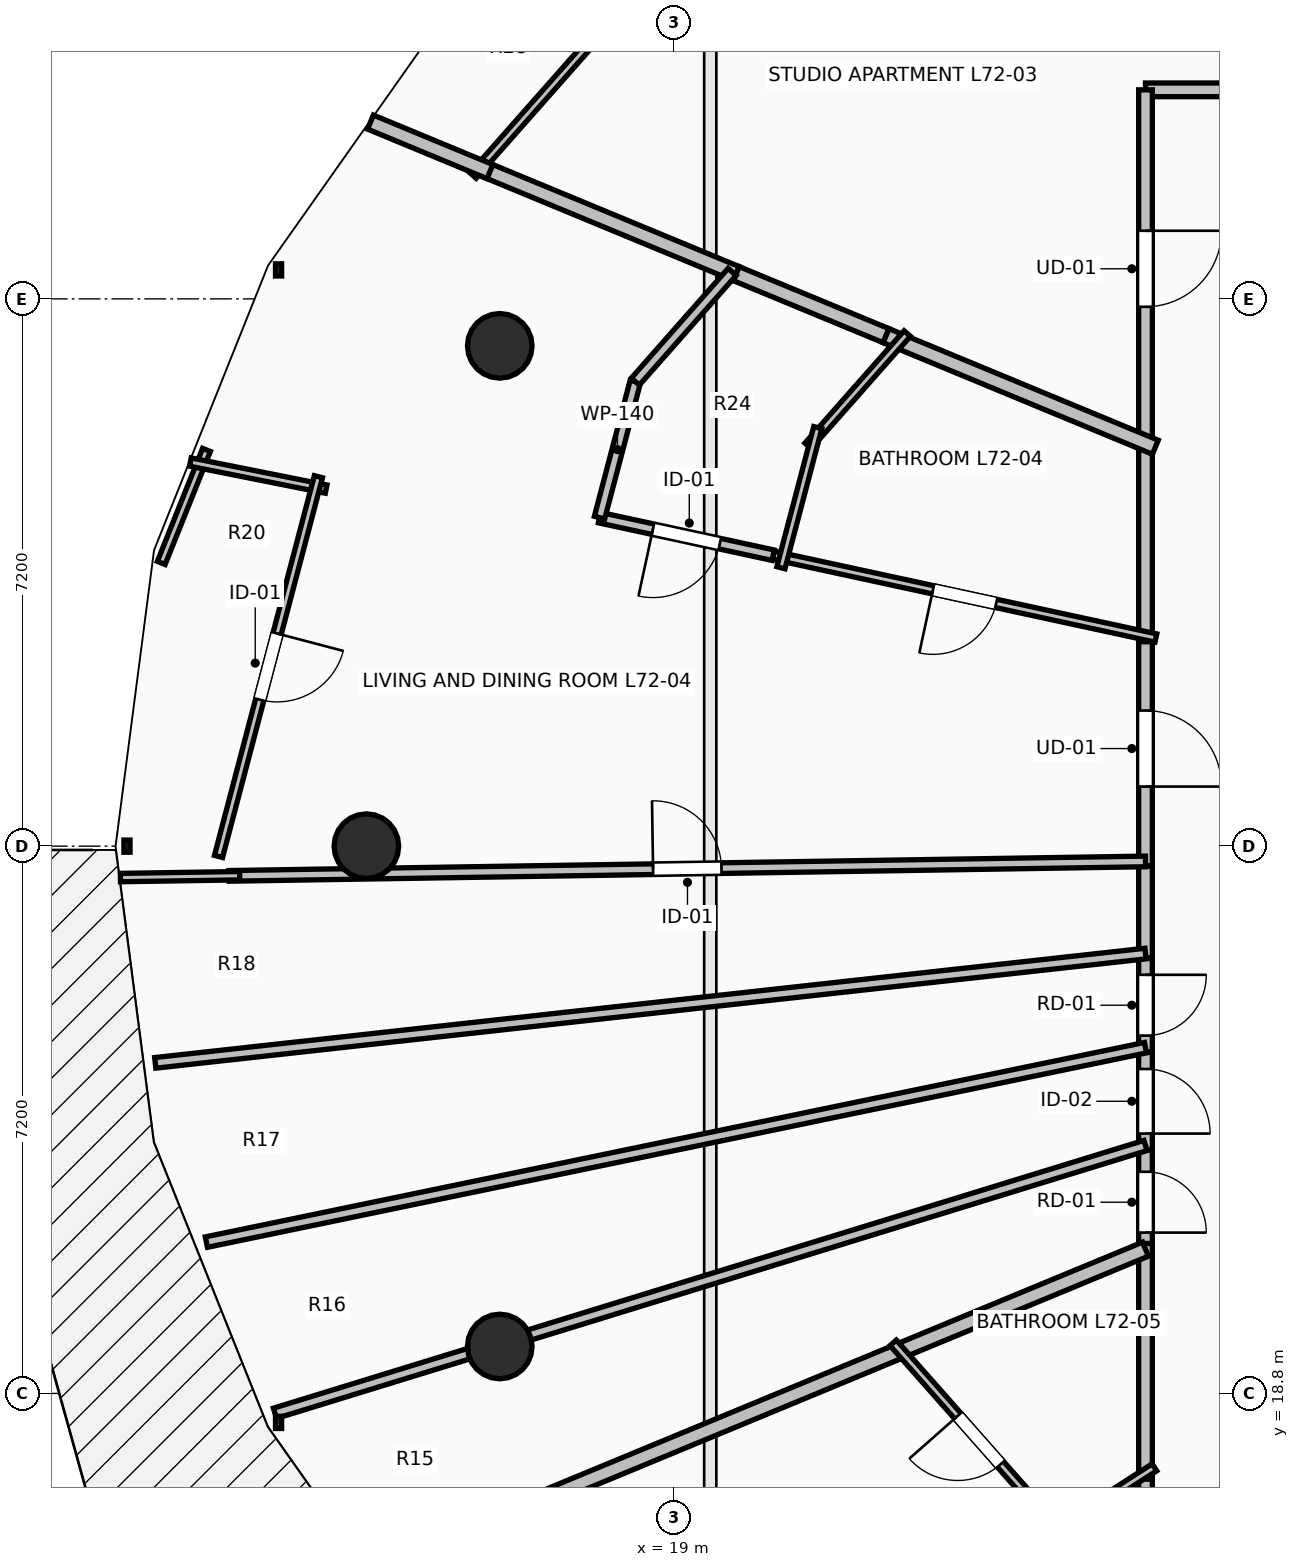
"""IFC4 building model, lengths in metres.
Left out: names, types, materials, properties, quantities, classifications, styles, units other than length and angle.
Written with IfcOpenShell. Run it as: python <this file> out.ifc"""

import sys

from ifc_helpers import new_model, si_unit, direction, frame, frame_2d, origin, origin_2d, place, context, subcontext, project, spatial, rectangle, circle, extrude, element, fill, save


model = new_model("IFC4")
c1 = context("Model", 3, precision=1e-05, world=origin(), true_north=direction((0.0, 1.0)))
c2 = subcontext(c1, "Body", "Model", "MODEL_VIEW")
j1 = project(units=[si_unit("LENGTHUNIT", "METRE"), si_unit("PLANEANGLEUNIT", "RADIAN")], contexts=[c1])
p1 = place(None, origin())
s1 = spatial("IfcSite", under=j1, at=p1, CompositionType="ELEMENT")
p2 = place(p1, origin())
s2 = spatial("IfcBuilding", under=s1, at=p2, CompositionType="ELEMENT")
p3 = place(p2, frame((0.0, 0.0, 266.2)))
s3 = spatial("IfcBuildingStorey", under=s2, at=p3, CompositionType="ELEMENT", Elevation=266.2)
for number, where, z_axis, x_axis in (
    (1, (16.705, 32.582, 0.0), (0.0, 0.0, 1.0), (-0.924, 0.383, 0.0)),
    (2, (14.95, 26.0, 0.0), (0.0, 0.0, 1.0), (-1.0, 0.0, 0.0)),
    (3, (16.705, 19.418, 0.0), (0.0, 0.0, 1.0), (-0.924, -0.383, 0.0)),
):
    element("IfcColumn", number, at=place(p3, frame(where, z_axis=z_axis, x_axis=x_axis)), inside=s3, PredefinedType="COLUMN", context=c2, shape_type="SweptSolid", body=[
        extrude(circle(Radius=0.425, at=origin_2d()), origin(), (0.0, 0.0, 1.0), 3.55),
    ])
p4 = place(p3, frame((29.006, 35.95, 0.0), z_axis=(0.0, 0.0, 1.0), x_axis=(-1.0, 0.0, 0.0)))
e4 = element("IfcWall", 4, at=p4, inside=s3, PredefinedType="PARTITIONING", context=c2, shape_type="SweptSolid", body=[
    extrude(rectangle(XDim=3.806, YDim=0.18, at=frame_2d((1.903, 0.0))), origin(), (0.0, 0.0, 1.0), 2.482),
])
p5 = place(p3, frame((25.2, 35.95, 0.0), z_axis=(0.0, 0.0, 1.0), x_axis=(0.0, -1.0, 0.0)))
e5 = element("IfcWall", 5, at=p5, inside=s3, PredefinedType="PARTITIONING", context=c2, shape_type="SweptSolid", body=[
    extrude(rectangle(XDim=4.708, YDim=0.18, at=frame_2d((2.354, 0.0))), origin(), (0.0, 0.0, 1.0), 2.482),
])
p6 = place(p5, frame((1.854, 0.0, 0.0)))
e6 = element("IfcOpeningElement", 6, at=p6, cuts=e5, PredefinedType="OPENING", context=c2, shape_type="SweptSolid", body=[
    extrude(rectangle(XDim=1.0, YDim=2.15, at=frame_2d((0.5, 1.075))), frame((0.0, 0.105, 0.0), z_axis=(0.0, -1.0, 0.0), x_axis=(1.0, 0.0, 0.0)), (0.0, 0.0, 1.0), 0.21),
])
p7 = place(p3, frame((25.2, 28.829, 0.0), z_axis=(0.0, 0.0, 1.0), x_axis=(0.0, -1.0, 0.0)))
e7 = element("IfcWall", 7, at=p7, inside=s3, PredefinedType="PARTITIONING", context=c2, shape_type="SweptSolid", body=[
    extrude(rectangle(XDim=3.09, YDim=0.18, at=frame_2d((1.545, 0.0))), origin(), (0.0, 0.0, 1.0), 2.482),
])
p8 = place(p7, frame((1.045, 0.0, 0.0)))
e8 = element("IfcOpeningElement", 8, at=p8, cuts=e7, PredefinedType="OPENING", context=c2, shape_type="SweptSolid", body=[
    extrude(rectangle(XDim=1.0, YDim=2.15, at=frame_2d((0.5, 1.075))), frame((0.0, 0.105, 0.0), z_axis=(0.0, -1.0, 0.0), x_axis=(1.0, 0.0, 0.0)), (0.0, 0.0, 1.0), 0.21),
])
p9 = place(p3, frame((25.2, 31.382, 0.0), z_axis=(0.0, 0.0, 1.0), x_axis=(0.0, -1.0, 0.0)))
e9 = element("IfcWall", 9, at=p9, inside=s3, PredefinedType="PARTITIONING", context=c2, shape_type="SweptSolid", body=[
    extrude(rectangle(XDim=2.693, YDim=0.18, at=frame_2d((1.347, 0.0))), origin(), (0.0, 0.0, 1.0), 2.482),
])
p10 = place(p3, frame((25.2, 25.739, 0.0), z_axis=(0.0, 0.0, 1.0), x_axis=(0.0, -1.0, 0.0)))
e10 = element("IfcWall", 10, at=p10, inside=s3, PredefinedType="PARTITIONING", context=c2, shape_type="SweptSolid", body=[
    extrude(rectangle(XDim=1.212, YDim=0.18, at=frame_2d((0.606, 0.0))), origin(), (0.0, 0.0, 1.0), 3.29),
])
p11 = place(p3, frame((25.2, 24.527, 0.0), z_axis=(0.0, 0.0, 1.0), x_axis=(0.0, -1.0, 0.0)))
e11 = element("IfcWall", 11, at=p11, inside=s3, PredefinedType="PARTITIONING", context=c2, shape_type="SweptSolid", body=[
    extrude(rectangle(XDim=1.239, YDim=0.18, at=frame_2d((0.62, 0.0))), origin(), (0.0, 0.0, 1.0), 3.29),
])
p12 = place(p11, frame((0.219, 0.0, 0.0)))
e12 = element("IfcOpeningElement", 12, at=p12, cuts=e11, PredefinedType="OPENING", context=c2, shape_type="SweptSolid", body=[
    extrude(rectangle(XDim=0.8, YDim=2.05, at=frame_2d((0.4, 1.025))), frame((0.0, 0.105, 0.0), z_axis=(0.0, -1.0, 0.0), x_axis=(1.0, 0.0, 0.0)), (0.0, 0.0, 1.0), 0.21),
])
p13 = place(p3, frame((25.2, 23.288, 0.0), z_axis=(0.0, 0.0, 1.0), x_axis=(0.0, -1.0, 0.0)))
e13 = element("IfcWall", 13, at=p13, inside=s3, PredefinedType="PARTITIONING", context=c2, shape_type="SweptSolid", body=[
    extrude(rectangle(XDim=1.289, YDim=0.18, at=frame_2d((0.645, 0.0))), origin(), (0.0, 0.0, 1.0), 3.29),
])
p14 = place(p13, frame((0.219, 0.0, 0.0)))
e14 = element("IfcOpeningElement", 14, at=p14, cuts=e13, PredefinedType="OPENING", context=c2, shape_type="SweptSolid", body=[
    extrude(rectangle(XDim=0.85, YDim=2.1, at=frame_2d((0.425, 1.05))), frame((0.0, 0.105, 0.0), z_axis=(0.0, -1.0, 0.0), x_axis=(1.0, 0.0, 0.0)), (0.0, 0.0, 1.0), 0.21),
])
p15 = place(p3, frame((25.2, 21.999, 0.0), z_axis=(0.0, 0.0, 1.0), x_axis=(0.0, -1.0, 0.0)))
e15 = element("IfcWall", 15, at=p15, inside=s3, PredefinedType="PARTITIONING", context=c2, shape_type="SweptSolid", body=[
    extrude(rectangle(XDim=1.366, YDim=0.18, at=frame_2d((0.683, 0.0))), origin(), (0.0, 0.0, 1.0), 3.29),
])
p16 = place(p15, frame((0.283, 0.0, 0.0)))
e16 = element("IfcOpeningElement", 16, at=p16, cuts=e15, PredefinedType="OPENING", context=c2, shape_type="SweptSolid", body=[
    extrude(rectangle(XDim=0.8, YDim=2.05, at=frame_2d((0.4, 1.025))), frame((0.0, 0.105, 0.0), z_axis=(0.0, -1.0, 0.0), x_axis=(1.0, 0.0, 0.0)), (0.0, 0.0, 1.0), 0.21),
])
p17 = place(p3, frame((25.2, 17.812, 0.0), z_axis=(0.0, 0.0, 1.0), x_axis=(0.0, -1.0, 0.0)))
e17 = element("IfcWall", 17, at=p17, inside=s3, PredefinedType="PARTITIONING", context=c2, shape_type="SweptSolid", body=[
    extrude(rectangle(XDim=3.762, YDim=0.18, at=frame_2d((1.881, 0.0))), origin(), (0.0, 0.0, 1.0), 2.482),
])
p18 = place(p17, frame((1.381, 0.0, 0.0)))
e18 = element("IfcOpeningElement", 18, at=p18, cuts=e17, PredefinedType="OPENING", context=c2, shape_type="SweptSolid", body=[
    extrude(rectangle(XDim=1.0, YDim=2.15, at=frame_2d((0.5, 1.075))), frame((0.0, 0.105, 0.0), z_axis=(0.0, -1.0, 0.0), x_axis=(1.0, 0.0, 0.0)), (0.0, 0.0, 1.0), 0.21),
])
p19 = place(p3, frame((25.2, 20.773, 0.0), z_axis=(0.0, 0.0, 1.0), x_axis=(0.0, -1.0, 0.0)))
e19 = element("IfcWall", 19, at=p19, inside=s3, PredefinedType="PARTITIONING", context=c2, shape_type="SweptSolid", body=[
    extrude(rectangle(XDim=3.101, YDim=0.18, at=frame_2d((1.55, 0.0))), origin(), (0.0, 0.0, 1.0), 3.29),
])
p20 = place(p3, frame((20.444, 39.452, 0.0), z_axis=(0.0, 0.0, 1.0), x_axis=(-0.662167862663, -0.749355537549, 0.0)))
e20 = element("IfcWall", 20, at=p20, inside=s3, PredefinedType="PARTITIONING", context=c2, shape_type="SweptSolid", body=[
    extrude(rectangle(XDim=6.177, YDim=0.11, at=frame_2d((3.089, 0.0))), origin(), (0.0, 0.0, 1.0), 3.29),
])
p21 = place(p20, frame((2.639, 0.0, 0.0)))
e21 = element("IfcOpeningElement", 21, at=p21, cuts=e20, PredefinedType="OPENING", context=c2, shape_type="SweptSolid", body=[
    extrude(rectangle(XDim=0.9, YDim=2.1, at=frame_2d((0.45, 1.05))), frame((0.0, 0.07, 0.0), z_axis=(0.0, -1.0, 0.0), x_axis=(1.0, 0.0, 0.0)), (0.0, 0.0, 1.0), 0.14),
])
p22 = place(p3, frame((16.446, 34.928, 0.0), z_axis=(0.0, 0.0, 1.0), x_axis=(0.923904292622, -0.3826236507, 0.0)))
e22 = element("IfcWall", 22, at=p22, inside=s3, PredefinedType="PARTITIONING", context=c2, shape_type="SweptSolid", body=[
    extrude(rectangle(XDim=3.648, YDim=0.2, at=frame_2d((1.824, 0.0))), origin(), (0.0, 0.0, 1.0), 2.874),
])
p23 = place(p3, frame((21.785, 32.717, 0.0), z_axis=(0.0, 0.0, 1.0), x_axis=(0.923878783617, -0.382685240352, 0.0)))
e23 = element("IfcWall", 23, at=p23, inside=s3, PredefinedType="PARTITIONING", context=c2, shape_type="SweptSolid", body=[
    extrude(rectangle(XDim=3.837, YDim=0.2, at=frame_2d((1.918, 0.0))), origin(), (0.0, 0.0, 1.0), 2.979),
])
p24 = place(p3, frame((19.817, 33.532, 0.0), z_axis=(0.0, 0.0, 1.0), x_axis=(0.92391905869, -0.382587993786, 0.0)))
e24 = element("IfcWall", 24, at=p24, inside=s3, PredefinedType="PARTITIONING", context=c2, shape_type="SweptSolid", body=[
    extrude(rectangle(XDim=2.13, YDim=0.2, at=frame_2d((1.065, 0.0))), origin(), (0.0, 0.0, 1.0), 2.936),
])
p25 = place(p3, frame((15.004, 35.526, 0.0), z_axis=(0.0, 0.0, 1.0), x_axis=(0.923843638485, -0.382770076719, 0.0)))
e25 = element("IfcWall", 25, at=p25, inside=s3, PredefinedType="PARTITIONING", context=c2, shape_type="SweptSolid", body=[
    extrude(rectangle(XDim=1.701, YDim=0.2, at=frame_2d((0.851, 0.0))), origin(), (0.0, 0.0, 1.0), 3.29),
])
p26 = place(p3, frame((25.337, 28.738, 0.0), z_axis=(0.0, 0.0, 1.0), x_axis=(-0.977382932841, 0.211477191656, 0.0)))
e26 = element("IfcWall", 26, at=p26, inside=s3, PredefinedType="PARTITIONING", context=c2, shape_type="SweptSolid", body=[
    extrude(rectangle(XDim=5.151, YDim=0.11, at=frame_2d((2.576, 0.0))), origin(), (0.0, 0.0, 1.0), 2.482),
])
p27 = place(p26, frame((2.15, 0.0, 0.0)))
e27 = element("IfcOpeningElement", 27, at=p27, cuts=e26, PredefinedType="OPENING", context=c2, shape_type="SweptSolid", body=[
    extrude(rectangle(XDim=0.85, YDim=2.1, at=frame_2d((0.425, 1.05))), frame((0.0, 0.07, 0.0), z_axis=(0.0, -1.0, 0.0), x_axis=(1.0, 0.0, 0.0)), (0.0, 0.0, 1.0), 0.14),
])
p28 = place(p3, frame((12.846, 31.213, 0.0), z_axis=(0.0, 0.0, 1.0), x_axis=(-0.371522095559, -0.928424112414, 0.0)))
e28 = element("IfcWall", 28, at=p28, inside=s3, PredefinedType="PARTITIONING", context=c2, shape_type="SweptSolid", body=[
    extrude(rectangle(XDim=1.602, YDim=0.11, at=frame_2d((0.801, 0.0))), origin(), (0.0, 0.0, 1.0), 3.29),
])
p29 = place(p3, frame((12.635, 31.053, 0.0), z_axis=(0.0, 0.0, 1.0), x_axis=(0.980704252003, -0.195497238094, 0.0)))
e29 = element("IfcWall", 29, at=p29, inside=s3, PredefinedType="PARTITIONING", context=c2, shape_type="SweptSolid", body=[
    extrude(rectangle(XDim=1.821, YDim=0.11, at=frame_2d((0.91, 0.0))), origin(), (0.0, 0.0, 1.0), 3.29),
])
p30 = place(p3, frame((14.319, 30.86, 0.0), z_axis=(0.0, 0.0, 1.0), x_axis=(-0.254404898477, -0.967097796312, 0.0)))
e30 = element("IfcWall", 30, at=p30, inside=s3, PredefinedType="PARTITIONING", context=c2, shape_type="SweptSolid", body=[
    extrude(rectangle(XDim=5.166, YDim=0.11, at=frame_2d((2.583, 0.0))), origin(), (0.0, 0.0, 1.0), 3.29),
])
p31 = place(p30, frame((2.133, 0.0, 0.0)))
e31 = element("IfcOpeningElement", 31, at=p31, cuts=e30, PredefinedType="OPENING", context=c2, shape_type="SweptSolid", body=[
    extrude(rectangle(XDim=0.9, YDim=2.1, at=frame_2d((0.45, 1.05))), frame((0.0, 0.07, 0.0), z_axis=(0.0, -1.0, 0.0), x_axis=(1.0, 0.0, 0.0)), (0.0, 0.0, 1.0), 0.14),
])
p32 = place(p3, frame((20.302, 29.828, 0.0), z_axis=(0.0, 0.0, 1.0), x_axis=(-0.977387924942, 0.211454118377, 0.0)))
e32 = element("IfcWall", 32, at=p32, inside=s3, PredefinedType="PARTITIONING", context=c2, shape_type="SweptSolid", body=[
    extrude(rectangle(XDim=2.338, YDim=0.14, at=frame_2d((1.169, 0.0))), origin(), (0.0, 0.0, 1.0), 2.936),
])
p33 = place(p32, frame((0.719, 0.0, 0.0)))
e33 = element("IfcOpeningElement", 33, at=p33, cuts=e32, PredefinedType="OPENING", context=c2, shape_type="SweptSolid", body=[
    extrude(rectangle(XDim=0.9, YDim=2.1, at=frame_2d((0.45, 1.05))), frame((0.0, 0.085, 0.0), z_axis=(0.0, -1.0, 0.0), x_axis=(1.0, 0.0, 0.0)), (0.0, 0.0, 1.0), 0.17),
])
p34 = place(p3, frame((18.017, 30.322, 0.0), z_axis=(0.0, 0.0, 1.0), x_axis=(0.254434866485, 0.967089912426, 0.0)))
e34 = element("IfcWall", 34, at=p34, inside=s3, PredefinedType="PARTITIONING", context=c2, shape_type="SweptSolid", body=[
    extrude(rectangle(XDim=1.851, YDim=0.14, at=frame_2d((0.926, 0.0))), origin(), (0.0, 0.0, 1.0), 2.482),
])
p35 = place(p3, frame((18.488, 32.112, 0.0), z_axis=(0.0, 0.0, 1.0), x_axis=(0.661856531983, 0.749630529709, 0.0)))
e35 = element("IfcWall", 35, at=p35, inside=s3, PredefinedType="PARTITIONING", context=c2, shape_type="SweptSolid", body=[
    extrude(rectangle(XDim=1.925, YDim=0.14, at=frame_2d((0.962, 0.0))), origin(), (0.0, 0.0, 1.0), 2.482),
])
p36 = place(p3, frame((13.143, 25.609, 0.0), z_axis=(0.0, 0.0, 1.0), x_axis=(0.999875613351, 0.015772058374, 0.0)))
e36 = element("IfcWall", 36, at=p36, inside=s3, PredefinedType="PARTITIONING", context=c2, shape_type="SweptSolid", body=[
    extrude(rectangle(XDim=12.058, YDim=0.14, at=frame_2d((6.029, 0.0))), origin(), (0.0, 0.0, 1.0), 2.874),
])
p37 = place(p36, frame((5.579, 0.0, 0.0)))
e37 = element("IfcOpeningElement", 37, at=p37, cuts=e36, PredefinedType="OPENING", context=c2, shape_type="SweptSolid", body=[
    extrude(rectangle(XDim=0.9, YDim=2.1, at=frame_2d((0.45, 1.05))), frame((0.0, 0.085, 0.0), z_axis=(0.0, -1.0, 0.0), x_axis=(1.0, 0.0, 0.0)), (0.0, 0.0, 1.0), 0.17),
])
p38 = place(p3, frame((22.066, 32.744, 0.0), z_axis=(0.0, 0.0, 1.0), x_axis=(-0.662047420969, -0.749461948593, 0.0)))
e38 = element("IfcWall", 38, at=p38, inside=s3, PredefinedType="PARTITIONING", context=c2, shape_type="SweptSolid", body=[
    extrude(rectangle(XDim=1.972, YDim=0.11, at=frame_2d((0.986, 0.0))), origin(), (0.0, 0.0, 1.0), 2.936),
])
p39 = place(p3, frame((20.889, 31.506, 0.0), z_axis=(0.0, 0.0, 1.0), x_axis=(-0.254568935897, -0.967054629727, 0.0)))
e39 = element("IfcWall", 39, at=p39, inside=s3, PredefinedType="PARTITIONING", context=c2, shape_type="SweptSolid", body=[
    extrude(rectangle(XDim=1.906, YDim=0.11, at=frame_2d((0.953, 0.0))), origin(), (0.0, 0.0, 1.0), 2.482),
])
p40 = place(p3, frame((11.714, 25.587, 0.0), z_axis=(0.0, 0.0, 1.0), x_axis=(0.9998813462, 0.015404334465, 0.0)))
e40 = element("IfcWall", 40, at=p40, inside=s3, PredefinedType="PARTITIONING", context=c2, shape_type="SweptSolid", body=[
    extrude(rectangle(XDim=1.569, YDim=0.11, at=frame_2d((0.785, 0.0))), origin(), (0.0, 0.0, 1.0), 3.29),
])
p41 = place(p3, frame((12.172, 23.149, 0.0), z_axis=(0.0, 0.0, 1.0), x_axis=(0.993963433103, 0.109711866515, 0.0)))
e41 = element("IfcWall", 41, at=p41, inside=s3, PredefinedType="PARTITIONING", context=c2, shape_type="SweptSolid", body=[
    extrude(rectangle(XDim=13.107, YDim=0.14, at=frame_2d((6.553, 0.0))), origin(), (0.0, 0.0, 1.0), 2.874),
])
p42 = place(p3, frame((12.845, 20.791, 0.0), z_axis=(0.0, 0.0, 1.0), x_axis=(0.97923049011, 0.202750208975, 0.0)))
e42 = element("IfcWall", 42, at=p42, inside=s3, PredefinedType="PARTITIONING", context=c2, shape_type="SweptSolid", body=[
    extrude(rectangle(XDim=12.617, YDim=0.14, at=frame_2d((6.309, 0.0))), origin(), (0.0, 0.0, 1.0), 2.874),
])
p43 = place(p3, frame((13.747, 18.539, 0.0), z_axis=(0.0, 0.0, 1.0), x_axis=(0.955802794564, 0.294008533725, 0.0)))
e43 = element("IfcWall", 43, at=p43, inside=s3, PredefinedType="PARTITIONING", context=c2, shape_type="SweptSolid", body=[
    extrude(rectangle(XDim=11.982, YDim=0.14, at=frame_2d((5.991, 0.0))), origin(), (0.0, 0.0, 1.0), 2.482),
])
p44 = place(p3, frame((15.133, 16.528, 0.0), z_axis=(0.0, 0.0, 1.0), x_axis=(0.923877013663, 0.382689513347, 0.0)))
e44 = element("IfcWall", 44, at=p44, inside=s3, PredefinedType="PARTITIONING", context=c2, shape_type="SweptSolid", body=[
    extrude(rectangle(XDim=10.896, YDim=0.2, at=frame_2d((5.448, 0.0))), origin(), (0.0, 0.0, 1.0), 2.482),
])
p45 = place(p3, frame((25.318, 17.828, 0.0), z_axis=(0.0, 0.0, 1.0), x_axis=(-0.840783734709, -0.541371140207, 0.0)))
e45 = element("IfcWall", 45, at=p45, inside=s3, PredefinedType="PARTITIONING", context=c2, shape_type="SweptSolid", body=[
    extrude(rectangle(XDim=1.649, YDim=0.11, at=frame_2d((0.824, 0.0))), origin(), (0.0, 0.0, 1.0), 2.482),
])
p46 = place(p3, frame((24.142, 16.906, 0.0), z_axis=(0.0, 0.0, 1.0), x_axis=(-0.662044708061, 0.749464345068, 0.0)))
e46 = element("IfcWall", 46, at=p46, inside=s3, PredefinedType="PARTITIONING", context=c2, shape_type="SweptSolid", body=[
    extrude(rectangle(XDim=3.416, YDim=0.11, at=frame_2d((1.708, 0.0))), origin(), (0.0, 0.0, 1.0), 2.482),
])
p47 = place(p46, frame((1.283, 0.0, 0.0)))
e47 = element("IfcOpeningElement", 47, at=p47, cuts=e46, PredefinedType="OPENING", context=c2, shape_type="SweptSolid", body=[
    extrude(rectangle(XDim=0.85, YDim=2.1, at=frame_2d((0.425, 1.05))), frame((0.0, 0.07, 0.0), z_axis=(0.0, -1.0, 0.0), x_axis=(1.0, 0.0, 0.0)), (0.0, 0.0, 1.0), 0.14),
])
p48 = place(p6, origin())
e48 = element("IfcDoor", 48, at=p48, inside=s3, OperationType="SINGLE_SWING_LEFT", PredefinedType="DOOR", context=c2, shape_type="SweptSolid", body=[
    extrude(rectangle(XDim=1.0, YDim=2.15, at=frame_2d((0.5, 1.075))), frame((0.0, 0.025, 0.0), z_axis=(0.0, -1.0, 0.0), x_axis=(1.0, 0.0, 0.0)), (0.0, 0.0, 1.0), 0.05),
])
fill(e6, e48)
p49 = place(p8, origin())
e49 = element("IfcDoor", 49, at=p49, inside=s3, OperationType="SINGLE_SWING_RIGHT", PredefinedType="DOOR", context=c2, shape_type="SweptSolid", body=[
    extrude(rectangle(XDim=1.0, YDim=2.15, at=frame_2d((0.5, 1.075))), frame((0.0, 0.025, 0.0), z_axis=(0.0, -1.0, 0.0), x_axis=(1.0, 0.0, 0.0)), (0.0, 0.0, 1.0), 0.05),
])
fill(e8, e49)
p50 = place(p27, origin())
e50 = element("IfcDoor", 50, at=p50, inside=s3, OperationType="SINGLE_SWING_RIGHT", PredefinedType="DOOR", context=c2, shape_type="SweptSolid", body=[
    extrude(rectangle(XDim=0.85, YDim=2.1, at=frame_2d((0.425, 1.05))), frame((0.0, 0.025, 0.0), z_axis=(0.0, -1.0, 0.0), x_axis=(1.0, 0.0, 0.0)), (0.0, 0.0, 1.0), 0.05),
])
fill(e27, e50)
p51 = place(p31, origin())
e51 = element("IfcDoor", 51, at=p51, inside=s3, OperationType="SINGLE_SWING_LEFT", PredefinedType="DOOR", context=c2, shape_type="SweptSolid", body=[
    extrude(rectangle(XDim=0.9, YDim=2.1, at=frame_2d((0.45, 1.05))), frame((0.0, 0.025, 0.0), z_axis=(0.0, -1.0, 0.0), x_axis=(1.0, 0.0, 0.0)), (0.0, 0.0, 1.0), 0.05),
])
fill(e31, e51)
p52 = place(p33, origin())
e52 = element("IfcDoor", 52, at=p52, inside=s3, OperationType="SINGLE_SWING_RIGHT", PredefinedType="DOOR", context=c2, shape_type="SweptSolid", body=[
    extrude(rectangle(XDim=0.9, YDim=2.1, at=frame_2d((0.45, 1.05))), frame((0.0, 0.025, 0.0), z_axis=(0.0, -1.0, 0.0), x_axis=(1.0, 0.0, 0.0)), (0.0, 0.0, 1.0), 0.05),
])
fill(e33, e52)
p53 = place(p37, origin())
e53 = element("IfcDoor", 53, at=p53, inside=s3, OperationType="SINGLE_SWING_LEFT", PredefinedType="DOOR", context=c2, shape_type="SweptSolid", body=[
    extrude(rectangle(XDim=0.9, YDim=2.1, at=frame_2d((0.45, 1.05))), frame((0.0, 0.025, 0.0), z_axis=(0.0, -1.0, 0.0), x_axis=(1.0, 0.0, 0.0)), (0.0, 0.0, 1.0), 0.05),
])
fill(e37, e53)
p54 = place(p47, origin())
e54 = element("IfcDoor", 54, at=p54, inside=s3, OperationType="SINGLE_SWING_RIGHT", PredefinedType="DOOR", context=c2, shape_type="SweptSolid", body=[
    extrude(rectangle(XDim=0.85, YDim=2.1, at=frame_2d((0.425, 1.05))), frame((0.0, 0.025, 0.0), z_axis=(0.0, -1.0, 0.0), x_axis=(1.0, 0.0, 0.0)), (0.0, 0.0, 1.0), 0.05),
])
fill(e47, e54)
p55 = place(p12, origin())
e55 = element("IfcDoor", 55, at=p55, inside=s3, OperationType="SINGLE_SWING_LEFT", PredefinedType="DOOR", context=c2, shape_type="SweptSolid", body=[
    extrude(rectangle(XDim=0.8, YDim=2.05, at=frame_2d((0.4, 1.025))), frame((0.0, 0.025, 0.0), z_axis=(0.0, -1.0, 0.0), x_axis=(1.0, 0.0, 0.0)), (0.0, 0.0, 1.0), 0.05),
])
fill(e12, e55)
p56 = place(p14, origin())
e56 = element("IfcDoor", 56, at=p56, inside=s3, OperationType="SINGLE_SWING_RIGHT", PredefinedType="DOOR", context=c2, shape_type="SweptSolid", body=[
    extrude(rectangle(XDim=0.85, YDim=2.1, at=frame_2d((0.425, 1.05))), frame((0.0, 0.025, 0.0), z_axis=(0.0, -1.0, 0.0), x_axis=(1.0, 0.0, 0.0)), (0.0, 0.0, 1.0), 0.05),
])
fill(e14, e56)
p57 = place(p16, origin())
e57 = element("IfcDoor", 57, at=p57, inside=s3, OperationType="SINGLE_SWING_RIGHT", PredefinedType="DOOR", context=c2, shape_type="SweptSolid", body=[
    extrude(rectangle(XDim=0.8, YDim=2.05, at=frame_2d((0.4, 1.025))), frame((0.0, 0.025, 0.0), z_axis=(0.0, -1.0, 0.0), x_axis=(1.0, 0.0, 0.0)), (0.0, 0.0, 1.0), 0.05),
])
fill(e16, e57)
save(model, sys.argv[1])
